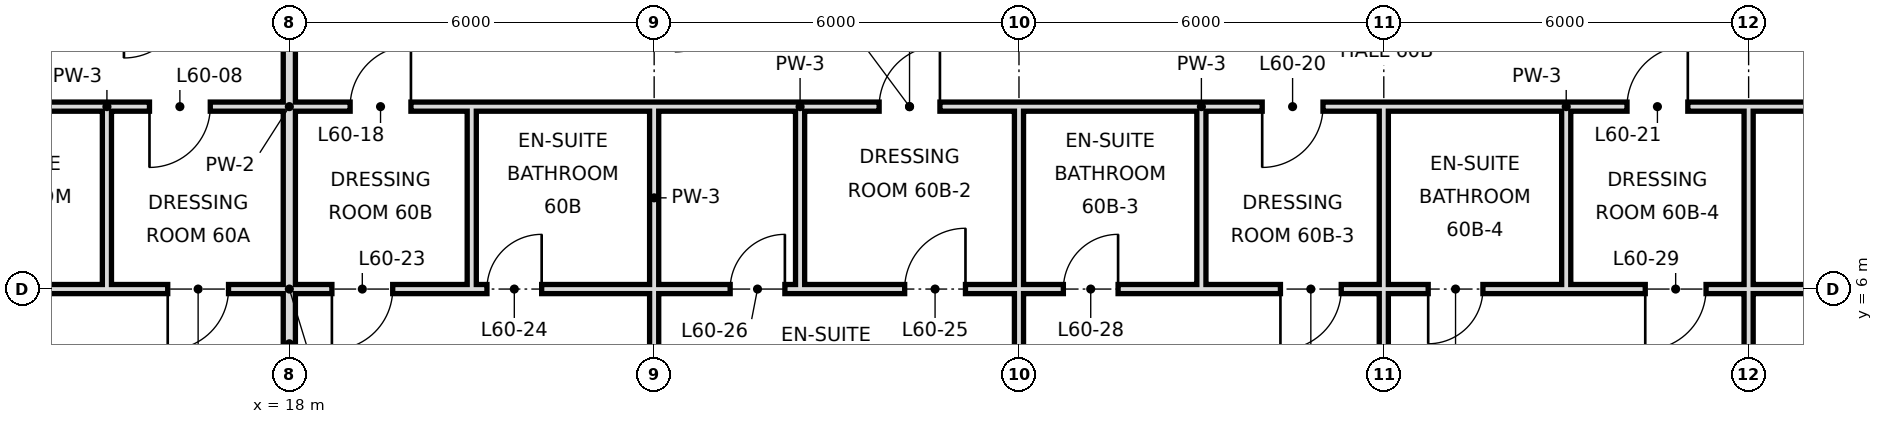
"""IFC4 building model, lengths in metres.
Left out: names, types, materials, properties, quantities, classifications, styles, units other than length and angle.
Written with IfcOpenShell. Run it as: python <this file> out.ifc"""

import sys

from ifc_helpers import new_model, si_unit, direction, frame, frame_2d, origin, place, context, subcontext, project, spatial, rectangle, extrude, element, fill, save


model = new_model("IFC4")
c1 = context("Model", 3, precision=1e-05, world=origin(), true_north=direction((0.0, 1.0)))
c2 = subcontext(c1, "Body", "Model", "MODEL_VIEW")
j1 = project(units=[si_unit("LENGTHUNIT", "METRE"), si_unit("PLANEANGLEUNIT", "RADIAN")], contexts=[c1])
p1 = place(None, origin())
s1 = spatial("IfcSite", under=j1, at=p1, CompositionType="ELEMENT")
p2 = place(p1, origin())
s2 = spatial("IfcBuilding", under=s1, at=p2, CompositionType="ELEMENT")
p3 = place(p2, frame((0.0, 0.0, 254.0)))
s3 = spatial("IfcBuildingStorey", under=s2, at=p3, CompositionType="ELEMENT", Elevation=254.0)
p4 = place(p3, frame((15.0, 6.0, 0.0), z_axis=(0.0, 0.0, 1.0), x_axis=(0.0, 1.0, 0.0)))
e1 = element("IfcWall", 1, at=p4, inside=s3, PredefinedType="PARTITIONING", context=c2, shape_type="SweptSolid", body=[
    extrude(rectangle(XDim=3.0, YDim=0.15, at=frame_2d((1.5, 0.0))), origin(), (0.0, 0.0, 1.0), 3.38),
])
p5 = place(p3, frame((18.0, -0.6, 0.0), z_axis=(0.0, 0.0, 1.0), x_axis=(0.0, 1.0, 0.0)))
e2 = element("IfcWall", 2, at=p5, inside=s3, PredefinedType="SOLIDWALL", context=c2, shape_type="SweptSolid", body=[
    extrude(rectangle(XDim=11.4, YDim=0.2, at=frame_2d((5.7, 0.0))), origin(), (0.0, 0.0, 1.0), 2.68),
])
p6 = place(p3, frame((21.0, 6.0, 0.0), z_axis=(0.0, 0.0, 1.0), x_axis=(0.0, 1.0, 0.0)))
e3 = element("IfcWall", 3, at=p6, inside=s3, PredefinedType="PARTITIONING", context=c2, shape_type="SweptSolid", body=[
    extrude(rectangle(XDim=3.0, YDim=0.15, at=frame_2d((1.5, 0.0))), origin(), (0.0, 0.0, 1.0), 3.38),
])
p7 = place(p3, frame((24.0, 0.0, 0.0), z_axis=(0.0, 0.0, 1.0), x_axis=(0.0, 1.0, 0.0)))
e4 = element("IfcWall", 4, at=p7, inside=s3, PredefinedType="PARTITIONING", context=c2, shape_type="SweptSolid", body=[
    extrude(rectangle(XDim=6.0, YDim=0.15, at=frame_2d((3.0, 0.0))), origin(), (0.0, 0.0, 1.0), 2.68),
])
p8 = place(p3, frame((24.0, 6.0, 0.0), z_axis=(0.0, 0.0, 1.0), x_axis=(0.0, 1.0, 0.0)))
e5 = element("IfcWall", 5, at=p8, inside=s3, PredefinedType="PARTITIONING", context=c2, shape_type="SweptSolid", body=[
    extrude(rectangle(XDim=3.0, YDim=0.15, at=frame_2d((1.5, 0.0))), origin(), (0.0, 0.0, 1.0), 2.68),
])
p9 = place(p3, frame((26.4, 6.0, 0.0), z_axis=(0.0, 0.0, 1.0), x_axis=(0.0, 1.0, 0.0)))
e6 = element("IfcWall", 6, at=p9, inside=s3, PredefinedType="PARTITIONING", context=c2, shape_type="SweptSolid", body=[
    extrude(rectangle(XDim=3.0, YDim=0.15, at=frame_2d((1.5, 0.0))), origin(), (0.0, 0.0, 1.0), 3.38),
])
p10 = place(p3, frame((30.0, -0.6, 0.0), z_axis=(0.0, 0.0, 1.0), x_axis=(0.0, 1.0, 0.0)))
e7 = element("IfcWall", 7, at=p10, inside=s3, PredefinedType="PARTITIONING", context=c2, shape_type="SweptSolid", body=[
    extrude(rectangle(XDim=6.6, YDim=0.15, at=frame_2d((3.3, 0.0))), origin(), (0.0, 0.0, 1.0), 2.68),
])
p11 = place(p3, frame((30.0, 6.0, 0.0), z_axis=(0.0, 0.0, 1.0), x_axis=(0.0, 1.0, 0.0)))
e8 = element("IfcWall", 8, at=p11, inside=s3, PredefinedType="PARTITIONING", context=c2, shape_type="SweptSolid", body=[
    extrude(rectangle(XDim=3.0, YDim=0.15, at=frame_2d((1.5, 0.0))), origin(), (0.0, 0.0, 1.0), 2.68),
])
p12 = place(p3, frame((33.0, 6.0, 0.0), z_axis=(0.0, 0.0, 1.0), x_axis=(0.0, 1.0, 0.0)))
e9 = element("IfcWall", 9, at=p12, inside=s3, PredefinedType="PARTITIONING", context=c2, shape_type="SweptSolid", body=[
    extrude(rectangle(XDim=3.0, YDim=0.15, at=frame_2d((1.5, 0.0))), origin(), (0.0, 0.0, 1.0), 3.38),
])
p13 = place(p3, frame((36.0, 0.0, 0.0), z_axis=(0.0, 0.0, 1.0), x_axis=(0.0, 1.0, 0.0)))
e10 = element("IfcWall", 10, at=p13, inside=s3, PredefinedType="PARTITIONING", context=c2, shape_type="SweptSolid", body=[
    extrude(rectangle(XDim=6.0, YDim=0.15, at=frame_2d((3.0, 0.0))), origin(), (0.0, 0.0, 1.0), 2.68),
])
p14 = place(p3, frame((36.0, 6.0, 0.0), z_axis=(0.0, 0.0, 1.0), x_axis=(0.0, 1.0, 0.0)))
e11 = element("IfcWall", 11, at=p14, inside=s3, PredefinedType="PARTITIONING", context=c2, shape_type="SweptSolid", body=[
    extrude(rectangle(XDim=3.0, YDim=0.15, at=frame_2d((1.5, 0.0))), origin(), (0.0, 0.0, 1.0), 2.68),
])
p15 = place(p3, frame((39.0, 6.0, 0.0), z_axis=(0.0, 0.0, 1.0), x_axis=(0.0, 1.0, 0.0)))
e12 = element("IfcWall", 12, at=p15, inside=s3, PredefinedType="PARTITIONING", context=c2, shape_type="SweptSolid", body=[
    extrude(rectangle(XDim=3.0, YDim=0.15, at=frame_2d((1.5, 0.0))), origin(), (0.0, 0.0, 1.0), 3.38),
])
p16 = place(p3, frame((42.0, -0.6, 0.0), z_axis=(0.0, 0.0, 1.0), x_axis=(0.0, 1.0, 0.0)))
e13 = element("IfcWall", 13, at=p16, inside=s3, PredefinedType="PARTITIONING", context=c2, shape_type="SweptSolid", body=[
    extrude(rectangle(XDim=9.6, YDim=0.15, at=frame_2d((4.8, 0.0))), origin(), (0.0, 0.0, 1.0), 2.68),
])
p17 = place(p3, frame((15.0, 6.0, 0.0), z_axis=(0.0, 0.0, 1.0), x_axis=(1.0, 0.0, 0.0)))
e14 = element("IfcWall", 14, at=p17, inside=s3, PredefinedType="PARTITIONING", context=c2, shape_type="SweptSolid", body=[
    extrude(rectangle(XDim=6.0, YDim=0.15, at=frame_2d((3.0, 0.0))), origin(), (0.0, 0.0, 1.0), 2.93),
])
p18 = place(p17, frame((1.0, 0.0, 0.0)))
e15 = element("IfcOpeningElement", 15, at=p18, cuts=e14, PredefinedType="OPENING", context=c2, shape_type="SweptSolid", body=[
    extrude(rectangle(XDim=1.0, YDim=2.4, at=frame_2d((0.5, 1.2))), frame((0.0, 0.085, 0.0), z_axis=(0.0, -1.0, 0.0), x_axis=(1.0, 0.0, 0.0)), (0.0, 0.0, 1.0), 0.17),
])
p19 = place(p17, frame((3.7, 0.0, 0.0)))
e16 = element("IfcOpeningElement", 16, at=p19, cuts=e14, PredefinedType="OPENING", context=c2, shape_type="SweptSolid", body=[
    extrude(rectangle(XDim=1.0, YDim=2.4, at=frame_2d((0.5, 1.2))), frame((0.0, 0.085, 0.0), z_axis=(0.0, -1.0, 0.0), x_axis=(1.0, 0.0, 0.0)), (0.0, 0.0, 1.0), 0.17),
])
p20 = place(p3, frame((26.4, 6.0, 0.0), z_axis=(0.0, 0.0, 1.0), x_axis=(1.0, 0.0, 0.0)))
e17 = element("IfcWall", 17, at=p20, inside=s3, PredefinedType="PARTITIONING", context=c2, shape_type="SweptSolid", body=[
    extrude(rectangle(XDim=3.6, YDim=0.15, at=frame_2d((1.8, 0.0))), origin(), (0.0, 0.0, 1.0), 2.93),
])
p21 = place(p20, frame((1.72, 0.0, 0.0)))
e18 = element("IfcOpeningElement", 18, at=p21, cuts=e17, PredefinedType="OPENING", context=c2, shape_type="SweptSolid", body=[
    extrude(rectangle(XDim=1.0, YDim=2.4, at=frame_2d((0.5, 1.2))), frame((0.0, 0.085, 0.0), z_axis=(0.0, -1.0, 0.0), x_axis=(1.0, 0.0, 0.0)), (0.0, 0.0, 1.0), 0.17),
])
p22 = place(p3, frame((33.0, 6.0, 0.0), z_axis=(0.0, 0.0, 1.0), x_axis=(1.0, 0.0, 0.0)))
e19 = element("IfcWall", 19, at=p22, inside=s3, PredefinedType="PARTITIONING", context=c2, shape_type="SweptSolid", body=[
    extrude(rectangle(XDim=3.0, YDim=0.15, at=frame_2d((1.5, 0.0))), origin(), (0.0, 0.0, 1.0), 2.93),
])
p23 = place(p22, frame((1.3, 0.0, 0.0)))
e20 = element("IfcOpeningElement", 20, at=p23, cuts=e19, PredefinedType="OPENING", context=c2, shape_type="SweptSolid", body=[
    extrude(rectangle(XDim=1.0, YDim=2.4, at=frame_2d((0.5, 1.2))), frame((0.0, 0.085, 0.0), z_axis=(0.0, -1.0, 0.0), x_axis=(1.0, 0.0, 0.0)), (0.0, 0.0, 1.0), 0.17),
])
p24 = place(p3, frame((39.0, 6.0, 0.0), z_axis=(0.0, 0.0, 1.0), x_axis=(1.0, 0.0, 0.0)))
e21 = element("IfcWall", 21, at=p24, inside=s3, PredefinedType="PARTITIONING", context=c2, shape_type="SweptSolid", body=[
    extrude(rectangle(XDim=15.0, YDim=0.15, at=frame_2d((7.5, 0.0))), origin(), (0.0, 0.0, 1.0), 2.93),
])
p25 = place(p24, frame((1.3, 0.0, 0.0)))
e22 = element("IfcOpeningElement", 22, at=p25, cuts=e21, PredefinedType="OPENING", context=c2, shape_type="SweptSolid", body=[
    extrude(rectangle(XDim=1.0, YDim=2.4, at=frame_2d((0.5, 1.2))), frame((0.0, 0.085, 0.0), z_axis=(0.0, -1.0, 0.0), x_axis=(1.0, 0.0, 0.0)), (0.0, 0.0, 1.0), 0.17),
])
p26 = place(p24, frame((6.16, 0.0, 0.0)))
e23 = element("IfcOpeningElement", 23, at=p26, cuts=e21, PredefinedType="OPENING", context=c2, shape_type="SweptSolid", body=[
    extrude(rectangle(XDim=1.8, YDim=2.4, at=frame_2d((0.9, 1.2))), frame((0.0, 0.085, 0.0), z_axis=(0.0, -1.0, 0.0), x_axis=(1.0, 0.0, 0.0)), (0.0, 0.0, 1.0), 0.17),
])
p27 = place(p3, frame((12.0, 6.0, 0.0), z_axis=(0.0, 0.0, 1.0), x_axis=(1.0, 0.0, 0.0)))
e24 = element("IfcWall", 24, at=p27, inside=s3, PredefinedType="PARTITIONING", context=c2, shape_type="SweptSolid", body=[
    extrude(rectangle(XDim=3.0, YDim=0.15, at=frame_2d((1.5, 0.0))), origin(), (0.0, 0.0, 1.0), 2.93),
])
p28 = place(p27, frame((0.73, 0.0, 0.0)))
e25 = element("IfcOpeningElement", 25, at=p28, cuts=e24, PredefinedType="OPENING", context=c2, shape_type="SweptSolid", body=[
    extrude(rectangle(XDim=0.9, YDim=2.4, at=frame_2d((0.45, 1.2))), frame((0.0, 0.085, 0.0), z_axis=(0.0, -1.0, 0.0), x_axis=(1.0, 0.0, 0.0)), (0.0, 0.0, 1.0), 0.17),
])
p29 = place(p3, frame((21.0, 6.0, 0.0), z_axis=(0.0, 0.0, 1.0), x_axis=(1.0, 0.0, 0.0)))
e26 = element("IfcWall", 26, at=p29, inside=s3, PredefinedType="PARTITIONING", context=c2, shape_type="SweptSolid", body=[
    extrude(rectangle(XDim=5.4, YDim=0.15, at=frame_2d((2.7, 0.0))), origin(), (0.0, 0.0, 1.0), 2.93),
])
p30 = place(p29, frame((0.25, 0.0, 0.0)))
e27 = element("IfcOpeningElement", 27, at=p30, cuts=e26, PredefinedType="OPENING", context=c2, shape_type="SweptSolid", body=[
    extrude(rectangle(XDim=0.9, YDim=2.4, at=frame_2d((0.45, 1.2))), frame((0.0, 0.085, 0.0), z_axis=(0.0, -1.0, 0.0), x_axis=(1.0, 0.0, 0.0)), (0.0, 0.0, 1.0), 0.17),
])
p31 = place(p29, frame((4.25, 0.0, 0.0)))
e28 = element("IfcOpeningElement", 28, at=p31, cuts=e26, PredefinedType="OPENING", context=c2, shape_type="SweptSolid", body=[
    extrude(rectangle(XDim=0.9, YDim=2.4, at=frame_2d((0.45, 1.2))), frame((0.0, 0.085, 0.0), z_axis=(0.0, -1.0, 0.0), x_axis=(1.0, 0.0, 0.0)), (0.0, 0.0, 1.0), 0.17),
])
p32 = place(p3, frame((30.0, 6.0, 0.0), z_axis=(0.0, 0.0, 1.0), x_axis=(1.0, 0.0, 0.0)))
e29 = element("IfcWall", 29, at=p32, inside=s3, PredefinedType="PARTITIONING", context=c2, shape_type="SweptSolid", body=[
    extrude(rectangle(XDim=3.0, YDim=0.15, at=frame_2d((1.5, 0.0))), origin(), (0.0, 0.0, 1.0), 2.93),
])
p33 = place(p32, frame((0.73, 0.0, 0.0)))
e30 = element("IfcOpeningElement", 30, at=p33, cuts=e29, PredefinedType="OPENING", context=c2, shape_type="SweptSolid", body=[
    extrude(rectangle(XDim=0.9, YDim=2.4, at=frame_2d((0.45, 1.2))), frame((0.0, 0.085, 0.0), z_axis=(0.0, -1.0, 0.0), x_axis=(1.0, 0.0, 0.0)), (0.0, 0.0, 1.0), 0.17),
])
p34 = place(p3, frame((36.0, 6.0, 0.0), z_axis=(0.0, 0.0, 1.0), x_axis=(1.0, 0.0, 0.0)))
e31 = element("IfcWall", 31, at=p34, inside=s3, PredefinedType="PARTITIONING", context=c2, shape_type="SweptSolid", body=[
    extrude(rectangle(XDim=3.0, YDim=0.15, at=frame_2d((1.5, 0.0))), origin(), (0.0, 0.0, 1.0), 2.93),
])
p35 = place(p34, frame((0.73, 0.0, 0.0)))
e32 = element("IfcOpeningElement", 32, at=p35, cuts=e31, PredefinedType="OPENING", context=c2, shape_type="SweptSolid", body=[
    extrude(rectangle(XDim=0.9, YDim=2.4, at=frame_2d((0.45, 1.2))), frame((0.0, 0.085, 0.0), z_axis=(0.0, -1.0, 0.0), x_axis=(1.0, 0.0, 0.0)), (0.0, 0.0, 1.0), 0.17),
])
p36 = place(p3, frame((15.0, 9.0, 0.0), z_axis=(0.0, 0.0, 1.0), x_axis=(1.0, 0.0, 0.0)))
e33 = element("IfcWall", 33, at=p36, inside=s3, PredefinedType="PARTITIONING", context=c2, shape_type="SweptSolid", body=[
    extrude(rectangle(XDim=6.0, YDim=0.15, at=frame_2d((3.0, 0.0))), origin(), (0.0, 0.0, 1.0), 3.38),
])
p37 = place(p36, frame((0.7, 0.0, 0.0)))
e34 = element("IfcOpeningElement", 34, at=p37, cuts=e33, PredefinedType="OPENING", context=c2, shape_type="SweptSolid", body=[
    extrude(rectangle(XDim=1.0, YDim=2.4, at=frame_2d((0.5, 1.2))), frame((0.0, 0.085, 0.0), z_axis=(0.0, -1.0, 0.0), x_axis=(1.0, 0.0, 0.0)), (0.0, 0.0, 1.0), 0.17),
])
p38 = place(p36, frame((4.0, 0.0, 0.0)))
e35 = element("IfcOpeningElement", 35, at=p38, cuts=e33, PredefinedType="OPENING", context=c2, shape_type="SweptSolid", body=[
    extrude(rectangle(XDim=1.0, YDim=2.4, at=frame_2d((0.5, 1.2))), frame((0.0, 0.085, 0.0), z_axis=(0.0, -1.0, 0.0), x_axis=(1.0, 0.0, 0.0)), (0.0, 0.0, 1.0), 0.17),
])
p39 = place(p3, frame((26.4, 9.0, 0.0), z_axis=(0.0, 0.0, 1.0), x_axis=(1.0, 0.0, 0.0)))
e36 = element("IfcWall", 36, at=p39, inside=s3, PredefinedType="PARTITIONING", context=c2, shape_type="SweptSolid", body=[
    extrude(rectangle(XDim=3.6, YDim=0.15, at=frame_2d((1.8, 0.0))), origin(), (0.0, 0.0, 1.0), 3.38),
])
p40 = place(p39, frame((1.3, 0.0, 0.0)))
e37 = element("IfcOpeningElement", 37, at=p40, cuts=e36, PredefinedType="OPENING", context=c2, shape_type="SweptSolid", body=[
    extrude(rectangle(XDim=1.0, YDim=2.4, at=frame_2d((0.5, 1.2))), frame((0.0, 0.085, 0.0), z_axis=(0.0, -1.0, 0.0), x_axis=(1.0, 0.0, 0.0)), (0.0, 0.0, 1.0), 0.17),
])
p41 = place(p3, frame((33.0, 9.0, 0.0), z_axis=(0.0, 0.0, 1.0), x_axis=(1.0, 0.0, 0.0)))
e38 = element("IfcWall", 38, at=p41, inside=s3, PredefinedType="PARTITIONING", context=c2, shape_type="SweptSolid", body=[
    extrude(rectangle(XDim=3.0, YDim=0.15, at=frame_2d((1.5, 0.0))), origin(), (0.0, 0.0, 1.0), 3.38),
])
p42 = place(p41, frame((1.0, 0.0, 0.0)))
e39 = element("IfcOpeningElement", 39, at=p42, cuts=e38, PredefinedType="OPENING", context=c2, shape_type="SweptSolid", body=[
    extrude(rectangle(XDim=1.0, YDim=2.4, at=frame_2d((0.5, 1.2))), frame((0.0, 0.085, 0.0), z_axis=(0.0, -1.0, 0.0), x_axis=(1.0, 0.0, 0.0)), (0.0, 0.0, 1.0), 0.17),
])
p43 = place(p3, frame((39.0, 9.0, 0.0), z_axis=(0.0, 0.0, 1.0), x_axis=(1.0, 0.0, 0.0)))
e40 = element("IfcWall", 40, at=p43, inside=s3, PredefinedType="PARTITIONING", context=c2, shape_type="SweptSolid", body=[
    extrude(rectangle(XDim=15.6, YDim=0.15, at=frame_2d((7.8, 0.0))), origin(), (0.0, 0.0, 1.0), 3.38),
])
p44 = place(p43, frame((1.0, 0.0, 0.0)))
e41 = element("IfcOpeningElement", 41, at=p44, cuts=e40, PredefinedType="OPENING", context=c2, shape_type="SweptSolid", body=[
    extrude(rectangle(XDim=1.0, YDim=2.4, at=frame_2d((0.5, 1.2))), frame((0.0, 0.085, 0.0), z_axis=(0.0, -1.0, 0.0), x_axis=(1.0, 0.0, 0.0)), (0.0, 0.0, 1.0), 0.17),
])
p45 = place(p43, frame((10.04, 0.0, 0.0)))
e42 = element("IfcOpeningElement", 42, at=p45, cuts=e40, PredefinedType="OPENING", context=c2, shape_type="SweptSolid", body=[
    extrude(rectangle(XDim=1.8, YDim=2.4, at=frame_2d((0.9, 1.2))), frame((0.0, 0.085, 0.0), z_axis=(0.0, -1.0, 0.0), x_axis=(1.0, 0.0, 0.0)), (0.0, 0.0, 1.0), 0.17),
])
p46 = place(p3, frame((12.0, 9.0, 0.0), z_axis=(0.0, 0.0, 1.0), x_axis=(1.0, 0.0, 0.0)))
e43 = element("IfcWall", 43, at=p46, inside=s3, PredefinedType="PARTITIONING", context=c2, shape_type="SweptSolid", body=[
    extrude(rectangle(XDim=3.0, YDim=0.15, at=frame_2d((1.5, 0.0))), origin(), (0.0, 0.0, 1.0), 3.38),
])
p47 = place(p3, frame((21.0, 9.0, 0.0), z_axis=(0.0, 0.0, 1.0), x_axis=(1.0, 0.0, 0.0)))
e44 = element("IfcWall", 44, at=p47, inside=s3, PredefinedType="PARTITIONING", context=c2, shape_type="SweptSolid", body=[
    extrude(rectangle(XDim=5.4, YDim=0.15, at=frame_2d((2.7, 0.0))), origin(), (0.0, 0.0, 1.0), 3.38),
])
for number, where, z_axis, x_axis in (
    (45, (30.0, 9.0, 0.0), (0.0, 0.0, 1.0), (1.0, 0.0, 0.0)),
    (46, (36.0, 9.0, 0.0), (0.0, 0.0, 1.0), (1.0, 0.0, 0.0)),
):
    element("IfcWall", number, at=place(p3, frame(where, z_axis=z_axis, x_axis=x_axis)), inside=s3, PredefinedType="PARTITIONING", context=c2, shape_type="SweptSolid", body=[
        extrude(rectangle(XDim=3.0, YDim=0.15, at=frame_2d((1.5, 0.0))), origin(), (0.0, 0.0, 1.0), 3.38),
    ])
p48 = place(p37, frame((1.0, 0.0, 0.0), z_axis=(0.0, 0.0, 1.0), x_axis=(-1.0, 0.0, 0.0)))
e47 = element("IfcDoor", 47, at=p48, inside=s3, OperationType="SINGLE_SWING_RIGHT", PredefinedType="DOOR", context=c2, shape_type="SweptSolid", body=[
    extrude(rectangle(XDim=1.0, YDim=2.4, at=frame_2d((0.5, 1.2))), frame((0.0, 0.025, 0.0), z_axis=(0.0, -1.0, 0.0), x_axis=(1.0, 0.0, 0.0)), (0.0, 0.0, 1.0), 0.05),
])
fill(e34, e47)
p49 = place(p18, frame((1.0, 0.0, 0.0), z_axis=(0.0, 0.0, 1.0), x_axis=(-1.0, 0.0, 0.0)))
e48 = element("IfcDoor", 48, at=p49, inside=s3, OperationType="SINGLE_SWING_RIGHT", PredefinedType="DOOR", context=c2, shape_type="SweptSolid", body=[
    extrude(rectangle(XDim=1.0, YDim=2.4, at=frame_2d((0.5, 1.2))), frame((0.0, 0.025, 0.0), z_axis=(0.0, -1.0, 0.0), x_axis=(1.0, 0.0, 0.0)), (0.0, 0.0, 1.0), 0.05),
])
fill(e15, e48)
p50 = place(p38, frame((1.0, 0.0, 0.0), z_axis=(0.0, 0.0, 1.0), x_axis=(-1.0, 0.0, 0.0)))
e49 = element("IfcDoor", 49, at=p50, inside=s3, OperationType="SINGLE_SWING_LEFT", PredefinedType="DOOR", context=c2, shape_type="SweptSolid", body=[
    extrude(rectangle(XDim=1.0, YDim=2.4, at=frame_2d((0.5, 1.2))), frame((0.0, 0.025, 0.0), z_axis=(0.0, -1.0, 0.0), x_axis=(1.0, 0.0, 0.0)), (0.0, 0.0, 1.0), 0.05),
])
fill(e35, e49)
p51 = place(p40, frame((1.0, 0.0, 0.0), z_axis=(0.0, 0.0, 1.0), x_axis=(-1.0, 0.0, 0.0)))
e50 = element("IfcDoor", 50, at=p51, inside=s3, OperationType="SINGLE_SWING_LEFT", PredefinedType="DOOR", context=c2, shape_type="SweptSolid", body=[
    extrude(rectangle(XDim=1.0, YDim=2.4, at=frame_2d((0.5, 1.2))), frame((0.0, 0.025, 0.0), z_axis=(0.0, -1.0, 0.0), x_axis=(1.0, 0.0, 0.0)), (0.0, 0.0, 1.0), 0.05),
])
fill(e37, e50)
p52 = place(p42, frame((1.0, 0.0, 0.0), z_axis=(0.0, 0.0, 1.0), x_axis=(-1.0, 0.0, 0.0)))
e51 = element("IfcDoor", 51, at=p52, inside=s3, OperationType="SINGLE_SWING_RIGHT", PredefinedType="DOOR", context=c2, shape_type="SweptSolid", body=[
    extrude(rectangle(XDim=1.0, YDim=2.4, at=frame_2d((0.5, 1.2))), frame((0.0, 0.025, 0.0), z_axis=(0.0, -1.0, 0.0), x_axis=(1.0, 0.0, 0.0)), (0.0, 0.0, 1.0), 0.05),
])
fill(e39, e51)
p53 = place(p44, frame((1.0, 0.0, 0.0), z_axis=(0.0, 0.0, 1.0), x_axis=(-1.0, 0.0, 0.0)))
e52 = element("IfcDoor", 52, at=p53, inside=s3, OperationType="SINGLE_SWING_LEFT", PredefinedType="DOOR", context=c2, shape_type="SweptSolid", body=[
    extrude(rectangle(XDim=1.0, YDim=2.4, at=frame_2d((0.5, 1.2))), frame((0.0, 0.025, 0.0), z_axis=(0.0, -1.0, 0.0), x_axis=(1.0, 0.0, 0.0)), (0.0, 0.0, 1.0), 0.05),
])
fill(e41, e52)
p54 = place(p19, frame((1.0, 0.0, 0.0), z_axis=(0.0, 0.0, 1.0), x_axis=(-1.0, 0.0, 0.0)))
e53 = element("IfcDoor", 53, at=p54, inside=s3, OperationType="SINGLE_SWING_RIGHT", PredefinedType="DOOR", context=c2, shape_type="SweptSolid", body=[
    extrude(rectangle(XDim=1.0, YDim=2.4, at=frame_2d((0.5, 1.2))), frame((0.0, 0.025, 0.0), z_axis=(0.0, -1.0, 0.0), x_axis=(1.0, 0.0, 0.0)), (0.0, 0.0, 1.0), 0.05),
])
fill(e16, e53)
p55 = place(p30, frame((0.9, 0.0, 0.0), z_axis=(0.0, 0.0, 1.0), x_axis=(-1.0, 0.0, 0.0)))
e54 = element("IfcDoor", 54, at=p55, inside=s3, OperationType="SINGLE_SWING_LEFT", PredefinedType="DOOR", context=c2, shape_type="SweptSolid", body=[
    extrude(rectangle(XDim=0.9, YDim=2.4, at=frame_2d((0.45, 1.2))), frame((0.0, 0.025, 0.0), z_axis=(0.0, -1.0, 0.0), x_axis=(1.0, 0.0, 0.0)), (0.0, 0.0, 1.0), 0.05),
])
fill(e27, e54)
p56 = place(p21, frame((1.0, 0.0, 0.0), z_axis=(0.0, 0.0, 1.0), x_axis=(-1.0, 0.0, 0.0)))
e55 = element("IfcDoor", 55, at=p56, inside=s3, OperationType="SINGLE_SWING_LEFT", PredefinedType="DOOR", context=c2, shape_type="SweptSolid", body=[
    extrude(rectangle(XDim=1.0, YDim=2.4, at=frame_2d((0.5, 1.2))), frame((0.0, 0.025, 0.0), z_axis=(0.0, -1.0, 0.0), x_axis=(1.0, 0.0, 0.0)), (0.0, 0.0, 1.0), 0.05),
])
fill(e18, e55)
p57 = place(p31, frame((0.9, 0.0, 0.0), z_axis=(0.0, 0.0, 1.0), x_axis=(-1.0, 0.0, 0.0)))
e56 = element("IfcDoor", 56, at=p57, inside=s3, OperationType="SINGLE_SWING_LEFT", PredefinedType="DOOR", context=c2, shape_type="SweptSolid", body=[
    extrude(rectangle(XDim=0.9, YDim=2.4, at=frame_2d((0.45, 1.2))), frame((0.0, 0.025, 0.0), z_axis=(0.0, -1.0, 0.0), x_axis=(1.0, 0.0, 0.0)), (0.0, 0.0, 1.0), 0.05),
])
fill(e28, e56)
p58 = place(p23, frame((1.0, 0.0, 0.0), z_axis=(0.0, 0.0, 1.0), x_axis=(-1.0, 0.0, 0.0)))
e57 = element("IfcDoor", 57, at=p58, inside=s3, OperationType="SINGLE_SWING_RIGHT", PredefinedType="DOOR", context=c2, shape_type="SweptSolid", body=[
    extrude(rectangle(XDim=1.0, YDim=2.4, at=frame_2d((0.5, 1.2))), frame((0.0, 0.025, 0.0), z_axis=(0.0, -1.0, 0.0), x_axis=(1.0, 0.0, 0.0)), (0.0, 0.0, 1.0), 0.05),
])
fill(e20, e57)
p59 = place(p33, frame((0.9, 0.0, 0.0), z_axis=(0.0, 0.0, 1.0), x_axis=(-1.0, 0.0, 0.0)))
e58 = element("IfcDoor", 58, at=p59, inside=s3, OperationType="SINGLE_SWING_LEFT", PredefinedType="DOOR", context=c2, shape_type="SweptSolid", body=[
    extrude(rectangle(XDim=0.9, YDim=2.4, at=frame_2d((0.45, 1.2))), frame((0.0, 0.025, 0.0), z_axis=(0.0, -1.0, 0.0), x_axis=(1.0, 0.0, 0.0)), (0.0, 0.0, 1.0), 0.05),
])
fill(e30, e58)
p60 = place(p25, frame((1.0, 0.0, 0.0), z_axis=(0.0, 0.0, 1.0), x_axis=(-1.0, 0.0, 0.0)))
e59 = element("IfcDoor", 59, at=p60, inside=s3, OperationType="SINGLE_SWING_RIGHT", PredefinedType="DOOR", context=c2, shape_type="SweptSolid", body=[
    extrude(rectangle(XDim=1.0, YDim=2.4, at=frame_2d((0.5, 1.2))), frame((0.0, 0.025, 0.0), z_axis=(0.0, -1.0, 0.0), x_axis=(1.0, 0.0, 0.0)), (0.0, 0.0, 1.0), 0.05),
])
fill(e22, e59)
p61 = place(p35, frame((0.9, 0.0, 0.0), z_axis=(0.0, 0.0, 1.0), x_axis=(-1.0, 0.0, 0.0)))
e60 = element("IfcDoor", 60, at=p61, inside=s3, OperationType="SINGLE_SWING_RIGHT", PredefinedType="DOOR", context=c2, shape_type="SweptSolid", body=[
    extrude(rectangle(XDim=0.9, YDim=2.4, at=frame_2d((0.45, 1.2))), frame((0.0, 0.025, 0.0), z_axis=(0.0, -1.0, 0.0), x_axis=(1.0, 0.0, 0.0)), (0.0, 0.0, 1.0), 0.05),
])
fill(e32, e60)
save(model, sys.argv[1])
